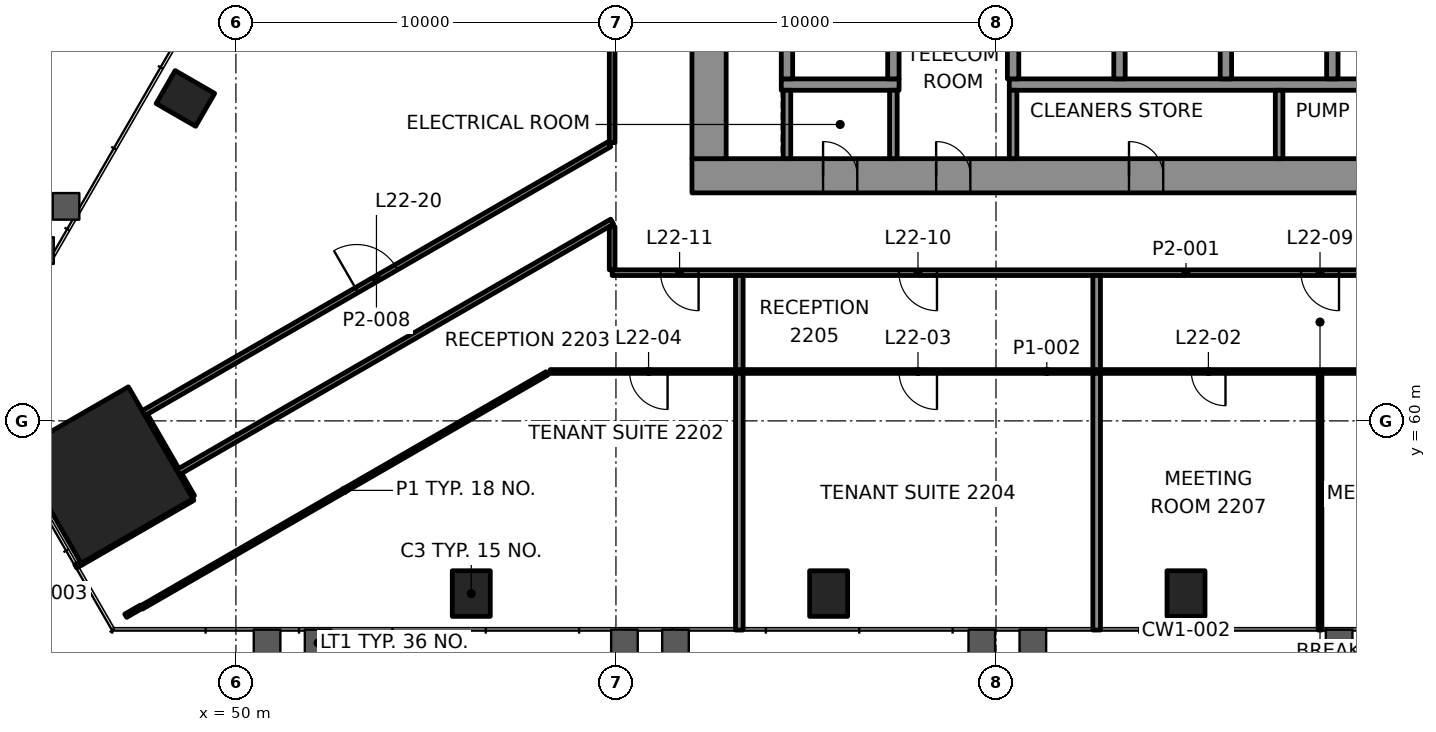
"""IFC4 building model, lengths in metres.
Left out: names, types, materials, properties, quantities, classifications, styles, units other than length and angle.
Written with IfcOpenShell. Run it as: python <this file> out.ifc"""

import sys

from ifc_helpers import new_model, si_unit, direction, frame, frame_2d, origin, origin_2d, place, context, subcontext, project, spatial, rectangle, extrude, element, fill, save


model = new_model("IFC4")
c1 = context("Model", 3, precision=1e-05, world=origin(), true_north=direction((0.0, 1.0)))
c2 = subcontext(c1, "Body", "Model", "MODEL_VIEW")
j1 = project(units=[si_unit("LENGTHUNIT", "METRE"), si_unit("PLANEANGLEUNIT", "RADIAN")], contexts=[c1])
p1 = place(None, origin())
s1 = spatial("IfcSite", under=j1, at=p1, CompositionType="ELEMENT")
p2 = place(p1, origin())
s2 = spatial("IfcBuilding", under=s1, at=p2, CompositionType="ELEMENT")
p3 = place(p2, frame((0.0, 0.0, 98.8)))
s3 = spatial("IfcBuildingStorey", under=s2, at=p3, CompositionType="ELEMENT", Elevation=98.8)
p4 = place(p3, frame((46.549, 58.574, 0.0), z_axis=(0.0, 0.0, 1.0), x_axis=(0.5, -0.866025403784, 0.0)))
e1 = element("IfcColumn", 1, at=p4, inside=s3, PredefinedType="COLUMN", context=c2, shape_type="SweptSolid", body=[
    extrude(rectangle(XDim=3.4, YDim=3.4, at=origin_2d()), origin(), (0.0, 0.0, 1.0), 4.2),
])
for number, where, z_axis, x_axis in (
    (2, (56.193, 55.456, -0.0), (0.0, 0.0, 1.0), (1.0, 0.0, 0.0)),
    (3, (65.597, 55.456, -0.0), (0.0, 0.0, 1.0), (1.0, 0.0, 0.0)),
    (4, (75.0, 55.456, -0.0), (0.0, 0.0, 1.0), (1.0, 0.0, 0.0)),
    (5, (48.671, 68.485, -0.0), (0.0, 0.0, 1.0), (-0.5, -0.866, 0.0)),
):
    element("IfcColumn", number, at=place(p3, frame(where, z_axis=z_axis, x_axis=x_axis)), inside=s3, PredefinedType="COLUMN", context=c2, shape_type="SweptSolid", body=[
        extrude(rectangle(XDim=1.0, YDim=1.2, at=origin_2d()), origin(), (0.0, 0.0, 1.0), 4.2),
    ])
p5 = place(p3, frame((62.0, 66.45, 0.0), z_axis=(0.0, 0.0, 1.0), x_axis=(1.0, 0.0, 0.0)))
e6 = element("IfcWall", 6, at=p5, inside=s3, PredefinedType="SHEAR", context=c2, shape_type="SweptSolid", body=[
    extrude(rectangle(XDim=26.0, YDim=0.9, at=frame_2d((13.0, 0.0))), origin(), (0.0, 0.0, 1.0), 4.0),
])
p6 = place(p5, frame((3.45, 0.0, 0.0)))
e7 = element("IfcOpeningElement", 7, at=p6, cuts=e6, PredefinedType="OPENING", context=c2, shape_type="SweptSolid", body=[
    extrude(rectangle(XDim=0.9, YDim=2.1, at=frame_2d((0.45, 1.05))), frame((0.0, 0.46, 0.0), z_axis=(0.0, -1.0, 0.0), x_axis=(1.0, 0.0, 0.0)), (0.0, 0.0, 1.0), 0.92),
])
p7 = place(p5, frame((6.425, 0.0, 0.0)))
e8 = element("IfcOpeningElement", 8, at=p7, cuts=e6, PredefinedType="OPENING", context=c2, shape_type="SweptSolid", body=[
    extrude(rectangle(XDim=0.9, YDim=2.1, at=frame_2d((0.45, 1.05))), frame((0.0, 0.46, 0.0), z_axis=(0.0, -1.0, 0.0), x_axis=(1.0, 0.0, 0.0)), (0.0, 0.0, 1.0), 0.92),
])
p8 = place(p5, frame((11.5, 0.0, 0.0)))
e9 = element("IfcOpeningElement", 9, at=p8, cuts=e6, PredefinedType="OPENING", context=c2, shape_type="SweptSolid", body=[
    extrude(rectangle(XDim=0.9, YDim=2.1, at=frame_2d((0.45, 1.05))), frame((0.0, 0.46, 0.0), z_axis=(0.0, -1.0, 0.0), x_axis=(1.0, 0.0, 0.0)), (0.0, 0.0, 1.0), 0.92),
])
p9 = place(p5, frame((18.5, 0.0, 0.0)))
e10 = element("IfcOpeningElement", 10, at=p9, cuts=e6, PredefinedType="OPENING", context=c2, shape_type="SweptSolid", body=[
    extrude(rectangle(XDim=0.9, YDim=2.1, at=frame_2d((0.45, 1.05))), frame((0.0, 0.46, 0.0), z_axis=(0.0, -1.0, 0.0), x_axis=(1.0, 0.0, 0.0)), (0.0, 0.0, 1.0), 0.92),
])
p10 = place(p5, frame((23.325, 0.0, 0.0)))
e11 = element("IfcOpeningElement", 11, at=p10, cuts=e6, PredefinedType="OPENING", context=c2, shape_type="SweptSolid", body=[
    extrude(rectangle(XDim=0.9, YDim=2.1, at=frame_2d((0.45, 1.05))), frame((0.0, 0.46, 0.0), z_axis=(0.0, -1.0, 0.0), x_axis=(1.0, 0.0, 0.0)), (0.0, 0.0, 1.0), 0.92),
])
p11 = place(p3, frame((62.45, 66.9, 0.0), z_axis=(0.0, 0.0, 1.0), x_axis=(0.0, 1.0, 0.0)))
e12 = element("IfcWall", 12, at=p11, inside=s3, PredefinedType="SHEAR", context=c2, shape_type="SweptSolid", body=[
    extrude(rectangle(XDim=16.2, YDim=0.9, at=frame_2d((8.1, 0.0))), origin(), (0.0, 0.0, 1.0), 4.0),
])
p12 = place(p11, frame((5.5, 0.0, 0.0)))
e13 = element("IfcOpeningElement", 13, at=p12, cuts=e12, PredefinedType="OPENING", context=c2, shape_type="SweptSolid", body=[
    extrude(rectangle(XDim=1.8, YDim=2.1, at=frame_2d((0.9, 1.05))), frame((0.0, 0.46, 0.0), z_axis=(0.0, -1.0, 0.0), x_axis=(1.0, 0.0, 0.0)), (0.0, 0.0, 1.0), 0.92),
])
p13 = place(p3, frame((64.35, 68.85, 0.0), z_axis=(0.0, 0.0, 1.0), x_axis=(1.0, 0.0, 0.0)))
e14 = element("IfcWall", 14, at=p13, inside=s3, PredefinedType="SHEAR", context=c2, shape_type="SweptSolid", body=[
    extrude(rectangle(XDim=3.1, YDim=0.3, at=frame_2d((1.55, 0.0))), origin(), (0.0, 0.0, 1.0), 4.0),
])
p14 = place(p3, frame((70.35, 68.85, 0.0), z_axis=(0.0, 0.0, 1.0), x_axis=(1.0, 0.0, 0.0)))
e15 = element("IfcWall", 15, at=p14, inside=s3, PredefinedType="SHEAR", context=c2, shape_type="SweptSolid", body=[
    extrude(rectangle(XDim=16.75, YDim=0.3, at=frame_2d((8.375, 0.0))), origin(), (0.0, 0.0, 1.0), 4.0),
])
for number, where, z_axis, x_axis in (
    (16, (64.5, 69.0, 0.0), (0.0, 0.0, 1.0), (0.0, 1.0, 0.0)),
    (17, (67.3, 69.0, 0.0), (0.0, 0.0, 1.0), (0.0, 1.0, 0.0)),
    (18, (70.45, 69.0, 0.0), (0.0, 0.0, 1.0), (0.0, 1.0, 0.0)),
    (19, (73.25, 69.0, 0.0), (0.0, 0.0, 1.0), (0.0, 1.0, 0.0)),
    (20, (76.05, 69.0, 0.0), (0.0, 0.0, 1.0), (0.0, 1.0, 0.0)),
    (21, (78.85, 69.0, 0.0), (0.0, 0.0, 1.0), (0.0, 1.0, 0.0)),
):
    element("IfcWall", number, at=place(p3, frame(where, z_axis=z_axis, x_axis=x_axis)), inside=s3, PredefinedType="SHEAR", context=c2, shape_type="SweptSolid", body=[
        extrude(rectangle(XDim=2.6, YDim=0.3, at=frame_2d((1.3, 0.0))), origin(), (0.0, 0.0, 1.0), 4.0),
    ])
p15 = place(p3, frame((84.403, 61.3, 0.0), z_axis=(0.0, 0.0, 1.0), x_axis=(-1.0, 0.0, 0.0)))
e22 = element("IfcWall", 22, at=p15, inside=s3, PredefinedType="PARTITIONING", context=c2, shape_type="SweptSolid", body=[
    extrude(rectangle(XDim=26.132, YDim=0.1, at=frame_2d((13.066, 0.0))), origin(), (0.0, 0.0, 1.0), 3.4),
])
p16 = place(p15, frame((2.59, 0.0, 0.0)))
e23 = element("IfcOpeningElement", 23, at=p16, cuts=e22, PredefinedType="OPENING", context=c2, shape_type="SweptSolid", body=[
    extrude(rectangle(XDim=0.9, YDim=2.1, at=frame_2d((0.45, 1.05))), frame((0.0, 0.06, 0.0), z_axis=(0.0, -1.0, 0.0), x_axis=(1.0, 0.0, 0.0)), (0.0, 0.0, 1.0), 0.12),
])
p17 = place(p15, frame((8.364, 0.0, 0.0)))
e24 = element("IfcOpeningElement", 24, at=p17, cuts=e22, PredefinedType="OPENING", context=c2, shape_type="SweptSolid", body=[
    extrude(rectangle(XDim=0.9, YDim=2.1, at=frame_2d((0.45, 1.05))), frame((0.0, 0.06, 0.0), z_axis=(0.0, -1.0, 0.0), x_axis=(1.0, 0.0, 0.0)), (0.0, 0.0, 1.0), 0.12),
])
p18 = place(p15, frame((15.956, 0.0, 0.0)))
e25 = element("IfcOpeningElement", 25, at=p18, cuts=e22, PredefinedType="OPENING", context=c2, shape_type="SweptSolid", body=[
    extrude(rectangle(XDim=1.0, YDim=2.1, at=frame_2d((0.5, 1.05))), frame((0.0, 0.06, 0.0), z_axis=(0.0, -1.0, 0.0), x_axis=(1.0, 0.0, 0.0)), (0.0, 0.0, 1.0), 0.12),
])
p19 = place(p15, frame((23.045, 0.0, 0.0)))
e26 = element("IfcOpeningElement", 26, at=p19, cuts=e22, PredefinedType="OPENING", context=c2, shape_type="SweptSolid", body=[
    extrude(rectangle(XDim=1.0, YDim=2.1, at=frame_2d((0.5, 1.05))), frame((0.0, 0.06, 0.0), z_axis=(0.0, -1.0, 0.0), x_axis=(1.0, 0.0, 0.0)), (0.0, 0.0, 1.0), 0.12),
])
p20 = place(p3, frame((90.1, 63.9, 0.0), z_axis=(0.0, 0.0, 1.0), x_axis=(-1.0, 0.0, 0.0)))
e27 = element("IfcWall", 27, at=p20, inside=s3, PredefinedType="PARTITIONING", context=c2, shape_type="SweptSolid", body=[
    extrude(rectangle(XDim=30.2, YDim=0.15, at=frame_2d((15.1, 0.0))), origin(), (0.0, 0.0, 1.0), 3.4),
])
p21 = place(p20, frame((2.35, 0.0, 0.0)))
e28 = element("IfcOpeningElement", 28, at=p21, cuts=e27, PredefinedType="OPENING", context=c2, shape_type="SweptSolid", body=[
    extrude(rectangle(XDim=1.2, YDim=2.1, at=frame_2d((0.6, 1.05))), frame((0.0, 0.085, 0.0), z_axis=(0.0, -1.0, 0.0), x_axis=(1.0, 0.0, 0.0)), (0.0, 0.0, 1.0), 0.17),
])
p22 = place(p20, frame((11.074, 0.0, 0.0)))
e29 = element("IfcOpeningElement", 29, at=p22, cuts=e27, PredefinedType="OPENING", context=c2, shape_type="SweptSolid", body=[
    extrude(rectangle(XDim=1.0, YDim=2.1, at=frame_2d((0.5, 1.05))), frame((0.0, 0.085, 0.0), z_axis=(0.0, -1.0, 0.0), x_axis=(1.0, 0.0, 0.0)), (0.0, 0.0, 1.0), 0.17),
])
p23 = place(p20, frame((21.653, 0.0, 0.0)))
e30 = element("IfcOpeningElement", 30, at=p23, cuts=e27, PredefinedType="OPENING", context=c2, shape_type="SweptSolid", body=[
    extrude(rectangle(XDim=1.0, YDim=2.1, at=frame_2d((0.5, 1.05))), frame((0.0, 0.085, 0.0), z_axis=(0.0, -1.0, 0.0), x_axis=(1.0, 0.0, 0.0)), (0.0, 0.0, 1.0), 0.17),
])
p24 = place(p20, frame((27.925, 0.0, 0.0)))
e31 = element("IfcOpeningElement", 31, at=p24, cuts=e27, PredefinedType="OPENING", context=c2, shape_type="SweptSolid", body=[
    extrude(rectangle(XDim=1.0, YDim=2.1, at=frame_2d((0.5, 1.05))), frame((0.0, 0.085, 0.0), z_axis=(0.0, -1.0, 0.0), x_axis=(1.0, 0.0, 0.0)), (0.0, 0.0, 1.0), 0.17),
])
p25 = place(p3, frame((47.519, 55.093, 0.0), z_axis=(0.0, 0.0, 1.0), x_axis=(0.866028767292, 0.499994174189, 0.0)))
e32 = element("IfcWall", 32, at=p25, inside=s3, PredefinedType="PARTITIONING", context=c2, shape_type="SweptSolid", body=[
    extrude(rectangle(XDim=12.315, YDim=0.1, at=frame_2d((6.157, 0.0))), origin(), (0.0, 0.0, 1.0), 3.4),
])
p26 = place(p3, frame((47.1, 54.873, 0.0), z_axis=(0.0, 0.0, 1.0), x_axis=(0.865944638795, 0.50013986298, 0.0)))
e33 = element("IfcWall", 33, at=p26, inside=s3, PredefinedType="PARTITIONING", context=c2, shape_type="SweptSolid", body=[
    extrude(rectangle(XDim=0.472, YDim=0.1, at=frame_2d((0.236, 0.0))), origin(), (0.0, 0.0, 1.0), 3.4),
])
p27 = place(p3, frame((45.788, 56.171, 0.0), z_axis=(0.0, 0.0, 1.0), x_axis=(0.866031398331, 0.499989616998, 0.0)))
e34 = element("IfcWall", 34, at=p27, inside=s3, PredefinedType="PARTITIONING", context=c2, shape_type="SweptSolid", body=[
    extrude(rectangle(XDim=3.56, YDim=0.1, at=frame_2d((1.78, 0.0))), origin(), (0.0, 0.0, 1.0), 3.4),
])
p28 = place(p3, frame((48.471, 58.644, 0.0), z_axis=(0.0, 0.0, 1.0), x_axis=(0.86602138367, 0.500006962977, 0.0)))
e35 = element("IfcWall", 35, at=p28, inside=s3, PredefinedType="PARTITIONING", context=c2, shape_type="SweptSolid", body=[
    extrude(rectangle(XDim=13.197, YDim=0.15, at=frame_2d((6.599, 0.0))), origin(), (0.0, 0.0, 1.0), 3.247),
])
p29 = place(p3, frame((47.571, 60.203, 0.0), z_axis=(0.0, 0.0, 1.0), x_axis=(0.866023815059, 0.500002751744, 0.0)))
e36 = element("IfcWall", 36, at=p29, inside=s3, PredefinedType="PARTITIONING", context=c2, shape_type="SweptSolid", body=[
    extrude(rectangle(XDim=14.149, YDim=0.15, at=frame_2d((7.075, 0.0))), origin(), (0.0, 0.0, 1.0), 3.4),
])
p30 = place(p29, frame((6.475, 0.0, 0.0)))
e37 = element("IfcOpeningElement", 37, at=p30, cuts=e36, PredefinedType="OPENING", context=c2, shape_type="SweptSolid", body=[
    extrude(rectangle(XDim=1.2, YDim=2.1, at=frame_2d((0.6, 1.05))), frame((0.0, 0.085, 0.0), z_axis=(0.0, -1.0, 0.0), x_axis=(1.0, 0.0, 0.0)), (0.0, 0.0, 1.0), 0.17),
])
p31 = place(p3, frame((78.526, 54.496, 0.0), z_axis=(0.0, 0.0, 1.0), x_axis=(0.0, 1.0, 0.0)))
e38 = element("IfcWall", 38, at=p31, inside=s3, PredefinedType="PARTITIONING", context=c2, shape_type="SweptSolid", body=[
    extrude(rectangle(XDim=6.754, YDim=0.1, at=frame_2d((3.377, 0.0))), origin(), (0.0, 0.0, 1.0), 3.165),
])
for number, where, z_axis, x_axis in (
    (39, (72.649, 54.496, 0.0), (0.0, 0.0, 1.0), (0.0, 1.0, 0.0)),
    (40, (63.246, 54.496, 0.0), (0.0, 0.0, 1.0), (0.0, 1.0, 0.0)),
):
    element("IfcWall", number, at=place(p3, frame(where, z_axis=z_axis, x_axis=x_axis)), inside=s3, PredefinedType="PARTITIONING", context=c2, shape_type="SweptSolid", body=[
        extrude(rectangle(XDim=6.754, YDim=0.2, at=frame_2d((3.377, 0.0))), origin(), (0.0, 0.0, 1.0), 3.165),
    ])
p32 = place(p3, frame((59.9, 63.976, 0.0), z_axis=(0.0, 0.0, 1.0), x_axis=(0.0, 1.0, 0.0)))
e41 = element("IfcWall", 41, at=p32, inside=s3, PredefinedType="PARTITIONING", context=c2, shape_type="SweptSolid", body=[
    extrude(rectangle(XDim=1.131, YDim=0.15, at=frame_2d((0.565, 0.0))), origin(), (0.0, 0.0, 1.0), 3.247),
])
p33 = place(p3, frame((59.9, 67.321, 0.0), z_axis=(0.0, 0.0, 1.0), x_axis=(0.0, 1.0, 0.0)))
e42 = element("IfcWall", 42, at=p33, inside=s3, PredefinedType="PARTITIONING", context=c2, shape_type="SweptSolid", body=[
    extrude(rectangle(XDim=18.778, YDim=0.15, at=frame_2d((9.389, 0.0))), origin(), (0.0, 0.0, 1.0), 3.4),
])
p34 = place(p3, frame((48.845, 57.995, 0.0), z_axis=(0.0, 0.0, 1.0), x_axis=(-0.499837337514, 0.866119296648, 0.0)))
e43 = element("IfcWall", 43, at=p34, inside=s3, PredefinedType="PARTITIONING", context=c2, shape_type="SweptSolid", body=[
    extrude(rectangle(XDim=0.675, YDim=0.15, at=frame_2d((0.337, 0.0))), origin(), (0.0, 0.0, 1.0), 3.4),
])
p35 = place(p3, frame((48.433, 58.709, 0.0), z_axis=(0.0, 0.0, 1.0), x_axis=(-0.500055614084, 0.865993292597, 0.0)))
e44 = element("IfcWall", 44, at=p35, inside=s3, PredefinedType="PARTITIONING", context=c2, shape_type="SweptSolid", body=[
    extrude(rectangle(XDim=1.649, YDim=0.15, at=frame_2d((0.825, 0.0))), origin(), (0.0, 0.0, 1.0), 3.247),
])
for number, where, z_axis, x_axis in (
    (45, (72.649, 61.35, 0.0), (0.0, 0.0, 1.0), (0.0, 1.0, 0.0)),
    (46, (63.246, 61.35, 0.0), (0.0, 0.0, 1.0), (0.0, 1.0, 0.0)),
):
    element("IfcWall", number, at=place(p3, frame(where, z_axis=z_axis, x_axis=x_axis)), inside=s3, PredefinedType="PARTITIONING", context=c2, shape_type="SweptSolid", body=[
        extrude(rectangle(XDim=2.475, YDim=0.2, at=frame_2d((1.237, 0.0))), origin(), (0.0, 0.0, 1.0), 3.4),
    ])
for number, where, z_axis, x_axis in (
    (47, (64.5, 66.9, 0.0), (0.0, 0.0, 1.0), (0.0, 1.0, 0.0)),
    (48, (67.3, 66.9, 0.0), (0.0, 0.0, 1.0), (0.0, 1.0, 0.0)),
    (49, (70.45, 66.9, 0.0), (0.0, 0.0, 1.0), (0.0, 1.0, 0.0)),
    (50, (77.45, 66.9, 0.0), (0.0, 0.0, 1.0), (0.0, 1.0, 0.0)),
):
    element("IfcWall", number, at=place(p3, frame(where, z_axis=z_axis, x_axis=x_axis)), inside=s3, PredefinedType="PARTITIONING", context=c2, shape_type="SweptSolid", body=[
        extrude(rectangle(XDim=1.8, YDim=0.2, at=frame_2d((0.9, 0.0))), origin(), (0.0, 0.0, 1.0), 4.0),
    ])
p36 = place(p17, origin())
e51 = element("IfcDoor", 51, at=p36, inside=s3, OperationType="SINGLE_SWING_LEFT", PredefinedType="DOOR", context=c2, shape_type="SweptSolid", body=[
    extrude(rectangle(XDim=0.9, YDim=2.1, at=frame_2d((0.45, 1.05))), frame((0.0, 0.025, 0.0), z_axis=(0.0, -1.0, 0.0), x_axis=(1.0, 0.0, 0.0)), (0.0, 0.0, 1.0), 0.05),
])
fill(e24, e51)
p37 = place(p18, origin())
e52 = element("IfcDoor", 52, at=p37, inside=s3, OperationType="SINGLE_SWING_RIGHT", PredefinedType="DOOR", context=c2, shape_type="SweptSolid", body=[
    extrude(rectangle(XDim=1.0, YDim=2.1, at=frame_2d((0.5, 1.05))), frame((0.0, 0.025, 0.0), z_axis=(0.0, -1.0, 0.0), x_axis=(1.0, 0.0, 0.0)), (0.0, 0.0, 1.0), 0.05),
])
fill(e25, e52)
p38 = place(p19, origin())
e53 = element("IfcDoor", 53, at=p38, inside=s3, OperationType="SINGLE_SWING_RIGHT", PredefinedType="DOOR", context=c2, shape_type="SweptSolid", body=[
    extrude(rectangle(XDim=1.0, YDim=2.1, at=frame_2d((0.5, 1.05))), frame((0.0, 0.025, 0.0), z_axis=(0.0, -1.0, 0.0), x_axis=(1.0, 0.0, 0.0)), (0.0, 0.0, 1.0), 0.05),
])
fill(e26, e53)
p39 = place(p22, origin())
e54 = element("IfcDoor", 54, at=p39, inside=s3, OperationType="SINGLE_SWING_RIGHT", PredefinedType="DOOR", context=c2, shape_type="SweptSolid", body=[
    extrude(rectangle(XDim=1.0, YDim=2.1, at=frame_2d((0.5, 1.05))), frame((0.0, 0.025, 0.0), z_axis=(0.0, -1.0, 0.0), x_axis=(1.0, 0.0, 0.0)), (0.0, 0.0, 1.0), 0.05),
])
fill(e29, e54)
p40 = place(p23, origin())
e55 = element("IfcDoor", 55, at=p40, inside=s3, OperationType="SINGLE_SWING_LEFT", PredefinedType="DOOR", context=c2, shape_type="SweptSolid", body=[
    extrude(rectangle(XDim=1.0, YDim=2.1, at=frame_2d((0.5, 1.05))), frame((0.0, 0.025, 0.0), z_axis=(0.0, -1.0, 0.0), x_axis=(1.0, 0.0, 0.0)), (0.0, 0.0, 1.0), 0.05),
])
fill(e30, e55)
p41 = place(p24, origin())
e56 = element("IfcDoor", 56, at=p41, inside=s3, OperationType="SINGLE_SWING_LEFT", PredefinedType="DOOR", context=c2, shape_type="SweptSolid", body=[
    extrude(rectangle(XDim=1.0, YDim=2.1, at=frame_2d((0.5, 1.05))), frame((0.0, 0.025, 0.0), z_axis=(0.0, -1.0, 0.0), x_axis=(1.0, 0.0, 0.0)), (0.0, 0.0, 1.0), 0.05),
])
fill(e31, e56)
p42 = place(p30, origin())
e57 = element("IfcDoor", 57, at=p42, inside=s3, OperationType="DOUBLE_DOOR_SINGLE_SWING", PredefinedType="DOOR", context=c2, shape_type="SweptSolid", body=[
    extrude(rectangle(XDim=1.2, YDim=2.1, at=frame_2d((0.6, 1.05))), frame((0.0, 0.025, 0.0), z_axis=(0.0, -1.0, 0.0), x_axis=(1.0, 0.0, 0.0)), (0.0, 0.0, 1.0), 0.05),
])
fill(e37, e57)
p43 = place(p6, origin())
e58 = element("IfcDoor", 58, at=p43, inside=s3, OperationType="SINGLE_SWING_LEFT", PredefinedType="DOOR", context=c2, shape_type="SweptSolid", body=[
    extrude(rectangle(XDim=0.9, YDim=2.1, at=frame_2d((0.45, 1.05))), frame((0.0, 0.17, 0.0), z_axis=(0.0, -1.0, 0.0), x_axis=(1.0, 0.0, 0.0)), (0.0, 0.0, 1.0), 0.34),
])
fill(e7, e58)
p44 = place(p7, origin())
e59 = element("IfcDoor", 59, at=p44, inside=s3, OperationType="SINGLE_SWING_RIGHT", PredefinedType="DOOR", context=c2, shape_type="SweptSolid", body=[
    extrude(rectangle(XDim=0.9, YDim=2.1, at=frame_2d((0.45, 1.05))), frame((0.0, 0.17, 0.0), z_axis=(0.0, -1.0, 0.0), x_axis=(1.0, 0.0, 0.0)), (0.0, 0.0, 1.0), 0.34),
])
fill(e8, e59)
p45 = place(p8, origin())
e60 = element("IfcDoor", 60, at=p45, inside=s3, OperationType="SINGLE_SWING_LEFT", PredefinedType="DOOR", context=c2, shape_type="SweptSolid", body=[
    extrude(rectangle(XDim=0.9, YDim=2.1, at=frame_2d((0.45, 1.05))), frame((0.0, 0.17, 0.0), z_axis=(0.0, -1.0, 0.0), x_axis=(1.0, 0.0, 0.0)), (0.0, 0.0, 1.0), 0.34),
])
fill(e9, e60)
save(model, sys.argv[1])
